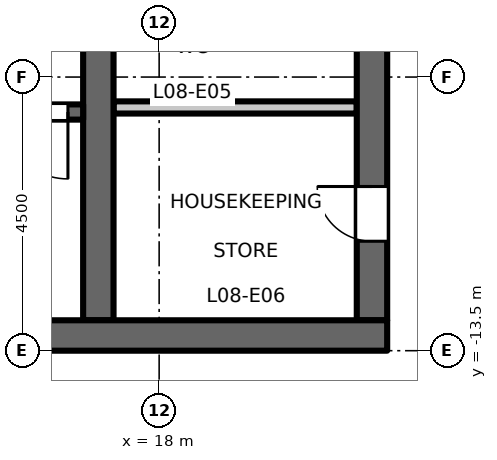
"""IFC4 building model, lengths in metres.
Left out: names, types, materials, properties, quantities, classifications, styles, units other than length and angle.
Written with IfcOpenShell. Run it as: python <this file> out.ifc"""

import sys

from ifc_helpers import new_model, si_unit, direction, frame, frame_2d, origin, place, context, subcontext, project, spatial, rectangle, extrude, element, fill, save


model = new_model("IFC4")
c1 = context("Model", 3, precision=1e-05, world=origin(), true_north=direction((0.0, 1.0)))
c2 = subcontext(c1, "Body", "Model", "MODEL_VIEW")
j1 = project(units=[si_unit("LENGTHUNIT", "METRE"), si_unit("PLANEANGLEUNIT", "RADIAN")], contexts=[c1])
p1 = place(None, origin())
s1 = spatial("IfcSite", under=j1, at=p1, CompositionType="ELEMENT")
p2 = place(p1, origin())
s2 = spatial("IfcBuilding", under=s1, at=p2, CompositionType="ELEMENT")
p3 = place(p2, frame((0.0, 0.0, 40.2)))
s3 = spatial("IfcBuildingStorey", under=s2, at=p3, CompositionType="ELEMENT", Elevation=40.2)
p4 = place(p3, frame((21.5, -13.0, 0.0), z_axis=(0.0, 0.0, 1.0), x_axis=(0.0, 1.0, 0.0)))
e1 = element("IfcWall", 1, at=p4, inside=s3, PredefinedType="SHEAR", context=c2, shape_type="SweptSolid", body=[
    extrude(rectangle(XDim=26.0, YDim=0.5, at=frame_2d((13.0, 0.0))), origin(), (0.0, 0.0, 1.0), 4.35),
])
p5 = place(p4, frame((16.825, 0.0, 0.0)))
e2 = element("IfcOpeningElement", 2, at=p5, cuts=e1, PredefinedType="OPENING", context=c2, shape_type="SweptSolid", body=[
    extrude(rectangle(XDim=1.8, YDim=2.1, at=frame_2d((0.9, 1.05))), frame((0.0, 0.26, 0.0), z_axis=(0.0, -1.0, 0.0), x_axis=(1.0, 0.0, 0.0)), (0.0, 0.0, 1.0), 0.52),
])
p6 = place(p4, frame((7.375, 0.0, 0.0)))
e3 = element("IfcOpeningElement", 3, at=p6, cuts=e1, PredefinedType="OPENING", context=c2, shape_type="SweptSolid", body=[
    extrude(rectangle(XDim=1.8, YDim=2.1, at=frame_2d((0.9, 1.05))), frame((0.0, 0.26, 0.0), z_axis=(0.0, -1.0, 0.0), x_axis=(1.0, 0.0, 0.0)), (0.0, 0.0, 1.0), 0.52),
])
p7 = place(p4, frame((1.3, 0.0, 0.0)))
e4 = element("IfcOpeningElement", 4, at=p7, cuts=e1, PredefinedType="OPENING", context=c2, shape_type="SweptSolid", body=[
    extrude(rectangle(XDim=0.9, YDim=2.1, at=frame_2d((0.45, 1.05))), frame((0.0, 0.26, 0.0), z_axis=(0.0, -1.0, 0.0), x_axis=(1.0, 0.0, 0.0)), (0.0, 0.0, 1.0), 0.52),
])
p8 = place(p3, frame((17.25, -9.5, 0.0), z_axis=(0.0, 0.0, 1.0), x_axis=(1.0, 0.0, 0.0)))
e5 = element("IfcWall", 5, at=p8, inside=s3, PredefinedType="PARTITIONING", context=c2, shape_type="SweptSolid", body=[
    extrude(rectangle(XDim=4.0, YDim=0.2, at=frame_2d((2.0, 0.0))), origin(), (0.0, 0.0, 1.0), 4.35),
])
p9 = place(p3, frame((17.0, -13.0, 0.0), z_axis=(0.0, 0.0, 1.0), x_axis=(0.0, 1.0, 0.0)))
e6 = element("IfcWall", 6, at=p9, inside=s3, PredefinedType="SHEAR", context=c2, shape_type="SweptSolid", body=[
    extrude(rectangle(XDim=6.575, YDim=0.5, at=frame_2d((3.288, 0.0))), origin(), (0.0, 0.0, 1.0), 4.35),
])
p10 = place(p3, frame((8.75, -9.575, 0.0), z_axis=(0.0, 0.0, 1.0), x_axis=(1.0, 0.0, 0.0)))
e7 = element("IfcWall", 7, at=p10, inside=s3, PredefinedType="SHEAR", context=c2, shape_type="SweptSolid", body=[
    extrude(rectangle(XDim=8.0, YDim=0.25, at=frame_2d((4.0, 0.0))), origin(), (0.0, 0.0, 1.0), 4.35),
])
p11 = place(p10, frame((6.65, 0.0, 0.0)))
e8 = element("IfcOpeningElement", 8, at=p11, cuts=e7, PredefinedType="OPENING", context=c2, shape_type="SweptSolid", body=[
    extrude(rectangle(XDim=1.1, YDim=2.1, at=frame_2d((0.55, 1.05))), frame((0.0, 0.135, 0.0), z_axis=(0.0, -1.0, 0.0), x_axis=(1.0, 0.0, 0.0)), (0.0, 0.0, 1.0), 0.27),
])
p12 = place(p3, frame((8.25, -13.25, 0.0), z_axis=(0.0, 0.0, 1.0), x_axis=(1.0, 0.0, 0.0)))
e9 = element("IfcWall", 9, at=p12, inside=s3, PredefinedType="SHEAR", context=c2, shape_type="SweptSolid", body=[
    extrude(rectangle(XDim=13.5, YDim=0.5, at=frame_2d((6.75, 0.0))), origin(), (0.0, 0.0, 1.0), 4.35),
])
p13 = place(p11, origin())
e10 = element("IfcDoor", 10, at=p13, inside=s3, OperationType="SINGLE_SWING_RIGHT", PredefinedType="DOOR", context=c2, shape_type="SweptSolid", body=[
    extrude(rectangle(XDim=1.1, YDim=2.1, at=frame_2d((0.55, 1.05))), frame((0.0, 0.025, 0.0), z_axis=(0.0, -1.0, 0.0), x_axis=(1.0, 0.0, 0.0)), (0.0, 0.0, 1.0), 0.05),
])
fill(e8, e10)
p14 = place(p7, origin())
e11 = element("IfcDoor", 11, at=p14, inside=s3, OperationType="SINGLE_SWING_LEFT", PredefinedType="DOOR", context=c2, shape_type="SweptSolid", body=[
    extrude(rectangle(XDim=0.9, YDim=2.1, at=frame_2d((0.45, 1.05))), frame((0.0, 0.025, 0.0), z_axis=(0.0, -1.0, 0.0), x_axis=(1.0, 0.0, 0.0)), (0.0, 0.0, 1.0), 0.05),
])
fill(e4, e11)
save(model, sys.argv[1])
